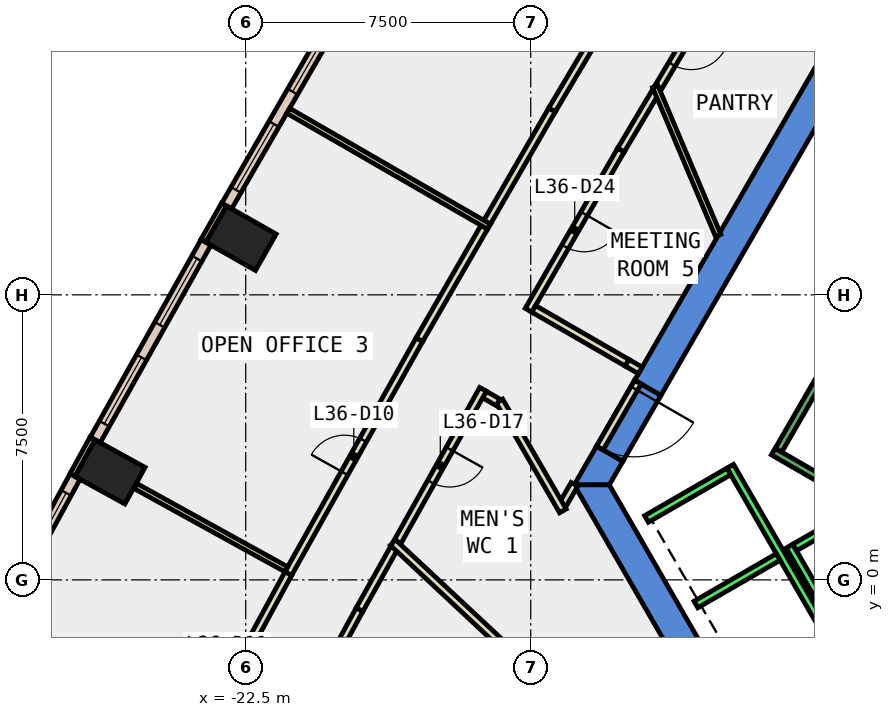
"""IFC4 building model, lengths in metres.
Left out: names, types, materials, properties, quantities, classifications, styles, units other than length and angle.
Written with IfcOpenShell. Run it as: python <this file> out.ifc"""

import sys

from ifc_helpers import new_model, si_unit, direction, frame, frame_2d, origin, origin_2d, place, context, subcontext, project, spatial, polyline, rectangle, outline, extrude, element, fill, save


model = new_model("IFC4")
c1 = context("Model", 3, precision=1e-05, world=origin(), true_north=direction((0.0, 1.0)))
c2 = subcontext(c1, "Body", "Model", "MODEL_VIEW")
j1 = project(units=[si_unit("LENGTHUNIT", "METRE"), si_unit("PLANEANGLEUNIT", "RADIAN")], contexts=[c1])
p1 = place(None, origin())
s1 = spatial("IfcSite", under=j1, at=p1, CompositionType="ELEMENT")
p2 = place(p1, origin())
s2 = spatial("IfcBuilding", under=s1, at=p2, CompositionType="ELEMENT")
p3 = place(p2, frame((0.0, 0.0, 163.4)))
s3 = spatial("IfcBuildingStorey", under=s2, at=p3, CompositionType="ELEMENT", Elevation=163.4)
for number, where, z_axis, x_axis in (
    (1, (-22.623, 8.991, -0.4), (0.0, 0.0, 1.0), (0.494, 0.869, 0.0)),
    (2, (-26.071, 2.841, -0.4), (0.0, 0.0, 1.0), (0.482, 0.876, 0.0)),
):
    element("IfcColumn", number, at=place(p3, frame(where, z_axis=z_axis, x_axis=x_axis)), inside=s3, PredefinedType="COLUMN", context=c2, shape_type="SweptSolid", body=[
        extrude(rectangle(XDim=1.1, YDim=1.5, at=origin_2d()), origin(), (0.0, 0.0, 1.0), 4.2),
    ])
p4 = place(p3, frame((0.0, 0.0, -0.4)))
e3 = element("IfcWall", 3, at=p4, inside=s3, PredefinedType="SHEAR", context=c2, shape_type="SweptSolid", body=[
    extrude(outline(polyline([(-12.267, 5.252), (-11.575, 4.852), (-6.466, 13.7), (-6.928, 14.5), (-12.267, 5.252)])), origin(), (0.0, 0.0, 1.0), 4.2),
])
p5 = place(p3, frame((0.0, 0.0, -0.4)))
e4 = element("IfcWall", 4, at=p5, inside=s3, PredefinedType="SHEAR", context=c2, shape_type="SweptSolid", body=[
    extrude(outline(polyline([(-12.575, 3.12), (-13.267, 3.52), (-13.856, 2.5), (-12.933, 2.5), (-12.575, 3.12)])), origin(), (0.0, 0.0, 1.0), 4.2),
])
p6 = place(p3, frame((0.0, 0.0, 3.6)))
e5 = element("IfcWall", 5, at=p6, inside=s3, PredefinedType="SHEAR", context=c2, shape_type="SweptSolid", body=[
    extrude(outline(polyline([(-13.267, 3.52), (-12.575, 3.12), (-11.575, 4.852), (-12.267, 5.252), (-13.267, 3.52)])), origin(), (0.0, 0.0, 1.0), 0.2),
])
p7 = place(p3, frame((0.0, 0.0, -0.4)))
e6 = element("IfcWall", 6, at=p7, inside=s3, PredefinedType="SHEAR", context=c2, shape_type="SweptSolid", body=[
    extrude(outline(polyline([(-13.856, 2.5), (-6.928, -9.5), (-6.466, -8.7), (-12.933, 2.5), (-13.856, 2.5)])), origin(), (0.0, 0.0, 1.0), 4.2),
])
p8 = place(p3, frame((-23.069, 9.877, 0.0), z_axis=(0.0, 0.0, 1.0), x_axis=(-0.494512685492, -0.869170411305, 0.0)))
e7 = element("IfcWall", 7, at=p8, inside=s3, PredefinedType="STANDARD", context=c2, shape_type="SweptSolid", body=[
    extrude(rectangle(XDim=1.1, YDim=0.15, at=frame_2d((0.55, 0.0))), origin(), (0.0, 0.0, 1.0), 3.8),
])
p9 = place(p3, frame((-26.529, 3.721, 0.0), z_axis=(0.0, 0.0, 1.0), x_axis=(-0.481850587491, -0.876253394478, 0.0)))
e8 = element("IfcWall", 8, at=p9, inside=s3, PredefinedType="STANDARD", context=c2, shape_type="SweptSolid", body=[
    extrude(rectangle(XDim=1.1, YDim=0.15, at=frame_2d((0.55, 0.0))), origin(), (0.0, 0.0, 1.0), 3.8),
])
p10 = place(p3, frame((-20.02, 15.002, 0.0), z_axis=(0.0, 0.0, 1.0), x_axis=(-0.49986421087, -0.866103787482, 0.0)))
e9 = element("IfcWall", 9, at=p10, inside=s3, PredefinedType="STANDARD", context=c2, shape_type="SweptSolid", body=[
    extrude(rectangle(XDim=5.964, YDim=0.3, at=frame_2d((2.982, 0.0))), origin(), (0.0, 0.0, 1.0), 3.8),
])
p11 = place(p10, frame((0.491, 0.0, 0.9)))
e10 = element("IfcOpeningElement", 10, at=p11, cuts=e9, PredefinedType="OPENING", context=c2, shape_type="SweptSolid", body=[
    extrude(rectangle(XDim=2.0, YDim=2.6, at=frame_2d((1.0, 1.3))), frame((0.0, 0.16, 0.0), z_axis=(0.0, -1.0, 0.0), x_axis=(1.0, 0.0, 0.0)), (0.0, 0.0, 1.0), 0.32),
])
p12 = place(p10, frame((3.473, 0.0, 0.9)))
e11 = element("IfcOpeningElement", 11, at=p12, cuts=e9, PredefinedType="OPENING", context=c2, shape_type="SweptSolid", body=[
    extrude(rectangle(XDim=2.0, YDim=2.6, at=frame_2d((1.0, 1.3))), frame((0.0, 0.16, 0.0), z_axis=(0.0, -1.0, 0.0), x_axis=(1.0, 0.0, 0.0)), (0.0, 0.0, 1.0), 0.32),
])
p13 = place(p3, frame((-23.544, 8.883, 0.0), z_axis=(0.0, 0.0, 1.0), x_axis=(-0.489032196971, -0.87226573378, 0.0)))
e12 = element("IfcWall", 12, at=p13, inside=s3, PredefinedType="STANDARD", context=c2, shape_type="SweptSolid", body=[
    extrude(rectangle(XDim=5.963, YDim=0.3, at=frame_2d((2.981, 0.0))), origin(), (0.0, 0.0, 1.0), 3.8),
])
p14 = place(p13, frame((0.491, 0.0, 0.9)))
e13 = element("IfcOpeningElement", 13, at=p14, cuts=e12, PredefinedType="OPENING", context=c2, shape_type="SweptSolid", body=[
    extrude(rectangle(XDim=2.0, YDim=2.6, at=frame_2d((1.0, 1.3))), frame((0.0, 0.16, 0.0), z_axis=(0.0, -1.0, 0.0), x_axis=(1.0, 0.0, 0.0)), (0.0, 0.0, 1.0), 0.32),
])
p15 = place(p13, frame((3.472, 0.0, 0.9)))
e14 = element("IfcOpeningElement", 14, at=p15, cuts=e12, PredefinedType="OPENING", context=c2, shape_type="SweptSolid", body=[
    extrude(rectangle(XDim=2.0, YDim=2.6, at=frame_2d((1.0, 1.3))), frame((0.0, 0.16, 0.0), z_axis=(0.0, -1.0, 0.0), x_axis=(1.0, 0.0, 0.0)), (0.0, 0.0, 1.0), 0.32),
])
p16 = place(p3, frame((-26.991, 2.72, 0.0), z_axis=(0.0, 0.0, 1.0), x_axis=(-0.477555226268, -0.878601733361, 0.0)))
e15 = element("IfcWall", 15, at=p16, inside=s3, PredefinedType="STANDARD", context=c2, shape_type="SweptSolid", body=[
    extrude(rectangle(XDim=5.964, YDim=0.3, at=frame_2d((2.982, 0.0))), origin(), (0.0, 0.0, 1.0), 3.8),
])
p17 = place(p16, frame((0.491, 0.0, 0.9)))
e16 = element("IfcOpeningElement", 16, at=p17, cuts=e15, PredefinedType="OPENING", context=c2, shape_type="SweptSolid", body=[
    extrude(rectangle(XDim=2.0, YDim=2.6, at=frame_2d((1.0, 1.3))), frame((0.0, 0.16, 0.0), z_axis=(0.0, -1.0, 0.0), x_axis=(1.0, 0.0, 0.0)), (0.0, 0.0, 1.0), 0.32),
])
p18 = place(p16, frame((3.473, 0.0, 0.9)))
e17 = element("IfcOpeningElement", 17, at=p18, cuts=e15, PredefinedType="OPENING", context=c2, shape_type="SweptSolid", body=[
    extrude(rectangle(XDim=2.0, YDim=2.6, at=frame_2d((1.0, 1.3))), frame((0.0, 0.16, 0.0), z_axis=(0.0, -1.0, 0.0), x_axis=(1.0, 0.0, 0.0)), (0.0, 0.0, 1.0), 0.32),
])
p19 = place(p3, frame((-10.41, 15.036, 0.0), z_axis=(0.0, 0.0, 1.0), x_axis=(-0.510900085603, -0.859640100583, 0.0)))
e18 = element("IfcWall", 18, at=p19, inside=s3, PredefinedType="PARTITIONING", context=c2, shape_type="SweptSolid", body=[
    extrude(rectangle(XDim=2.419, YDim=0.2, at=frame_2d((1.21, 0.0))), origin(), (0.0, 0.0, 1.0), 3.8),
])
p20 = place(p19, frame((0.709, 0.0, 0.0)))
e19 = element("IfcOpeningElement", 19, at=p20, cuts=e18, PredefinedType="OPENING", context=c2, shape_type="SweptSolid", body=[
    extrude(rectangle(XDim=1.0, YDim=2.1, at=frame_2d((0.5, 1.05))), frame((0.0, 0.11, 0.0), z_axis=(0.0, -1.0, 0.0), x_axis=(1.0, 0.0, 0.0)), (0.0, 0.0, 1.0), 0.22),
])
p21 = place(p3, frame((-11.723, 12.827, 0.0), z_axis=(0.0, 0.0, 1.0), x_axis=(-0.511182890129, -0.859471961637, 0.0)))
e20 = element("IfcWall", 20, at=p21, inside=s3, PredefinedType="PARTITIONING", context=c2, shape_type="SweptSolid", body=[
    extrude(rectangle(XDim=1.769, YDim=0.2, at=frame_2d((0.884, 0.0))), origin(), (0.0, 0.0, 1.0), 3.8),
])
p22 = place(p3, frame((-12.627, 11.307, 0.0), z_axis=(0.0, 0.0, 1.0), x_axis=(-0.499907870494, -0.866078588246, 0.0)))
e21 = element("IfcWall", 21, at=p22, inside=s3, PredefinedType="PARTITIONING", context=c2, shape_type="SweptSolid", body=[
    extrude(rectangle(XDim=4.863, YDim=0.2, at=frame_2d((2.432, 0.0))), origin(), (0.0, 0.0, 1.0), 3.8),
])
p23 = place(p22, frame((1.932, 0.0, 0.0)))
e22 = element("IfcOpeningElement", 22, at=p23, cuts=e21, PredefinedType="OPENING", context=c2, shape_type="SweptSolid", body=[
    extrude(rectangle(XDim=1.0, YDim=2.1, at=frame_2d((0.5, 1.05))), frame((0.0, 0.11, 0.0), z_axis=(0.0, -1.0, 0.0), x_axis=(1.0, 0.0, 0.0)), (0.0, 0.0, 1.0), 0.22),
])
p24 = place(p3, frame((-14.922, 7.131, 0.0), z_axis=(0.0, 0.0, 1.0), x_axis=(0.866124025492, -0.499829143273, 0.0)))
e23 = element("IfcWall", 23, at=p24, inside=s3, PredefinedType="PARTITIONING", context=c2, shape_type="SweptSolid", body=[
    extrude(rectangle(XDim=2.839, YDim=0.2, at=frame_2d((1.42, 0.0))), origin(), (0.0, 0.0, 1.0), 3.8),
])
p25 = place(p3, frame((-13.85, 2.514, 0.0), z_axis=(0.0, 0.0, 1.0), x_axis=(-0.500418219013, -0.865783810244, 0.0)))
e24 = element("IfcWall", 24, at=p25, inside=s3, PredefinedType="PARTITIONING", context=c2, shape_type="SweptSolid", body=[
    extrude(rectangle(XDim=0.607, YDim=0.2, at=frame_2d((0.304, 0.0))), origin(), (0.0, 0.0, 1.0), 3.8),
])
p26 = place(p3, frame((-14.154, 1.815, 0.0), z_axis=(0.0, 0.0, 1.0), x_axis=(-0.500038857296, 0.866002968352, 0.0)))
e25 = element("IfcWall", 25, at=p26, inside=s3, PredefinedType="PARTITIONING", context=c2, shape_type="SweptSolid", body=[
    extrude(rectangle(XDim=3.34, YDim=0.2, at=frame_2d((1.67, 0.0))), origin(), (0.0, 0.0, 1.0), 3.8),
])
p27 = place(p3, frame((-15.86, 4.671, 0.0), z_axis=(0.0, 0.0, 1.0), x_axis=(-0.866047486323, 0.49996174997, 0.0)))
e26 = element("IfcWall", 26, at=p27, inside=s3, PredefinedType="PARTITIONING", context=c2, shape_type="SweptSolid", body=[
    extrude(rectangle(XDim=0.412, YDim=0.2, at=frame_2d((0.206, 0.0))), origin(), (0.0, 0.0, 1.0), 3.8),
])
p28 = place(p3, frame((-16.255, 5.014, 0.0), z_axis=(0.0, 0.0, 1.0), x_axis=(-0.488988017817, -0.87229050117, 0.0)))
e27 = element("IfcWall", 27, at=p28, inside=s3, PredefinedType="PARTITIONING", context=c2, shape_type="SweptSolid", body=[
    extrude(rectangle(XDim=4.599, YDim=0.2, at=frame_2d((2.3, 0.0))), origin(), (0.0, 0.0, 1.0), 3.8),
])
p29 = place(p28, frame((1.8, 0.0, 0.0)))
e28 = element("IfcOpeningElement", 28, at=p29, cuts=e27, PredefinedType="OPENING", context=c2, shape_type="SweptSolid", body=[
    extrude(rectangle(XDim=1.0, YDim=2.1, at=frame_2d((0.5, 1.05))), frame((0.0, 0.11, 0.0), z_axis=(0.0, -1.0, 0.0), x_axis=(1.0, 0.0, 0.0)), (0.0, 0.0, 1.0), 0.22),
])
p30 = place(p3, frame((-18.602, 0.828, 0.0), z_axis=(0.0, 0.0, 1.0), x_axis=(-0.488969229043, -0.872301033502, 0.0)))
e29 = element("IfcWall", 29, at=p30, inside=s3, PredefinedType="PARTITIONING", context=c2, shape_type="SweptSolid", body=[
    extrude(rectangle(XDim=1.849, YDim=0.2, at=frame_2d((0.924, 0.0))), origin(), (0.0, 0.0, 1.0), 3.8),
])
p31 = place(p3, frame((-19.506, -0.785, 0.0), z_axis=(0.0, 0.0, 1.0), x_axis=(-0.477513909405, -0.878624189472, 0.0)))
e30 = element("IfcWall", 30, at=p31, inside=s3, PredefinedType="PARTITIONING", context=c2, shape_type="SweptSolid", body=[
    extrude(rectangle(XDim=6.956, YDim=0.2, at=frame_2d((3.478, 0.0))), origin(), (0.0, 0.0, 1.0), 3.8),
])
p32 = place(p31, frame((2.978, 0.0, 0.0)))
e31 = element("IfcOpeningElement", 31, at=p32, cuts=e30, PredefinedType="OPENING", context=c2, shape_type="SweptSolid", body=[
    extrude(rectangle(XDim=1.0, YDim=2.1, at=frame_2d((0.5, 1.05))), frame((0.0, 0.11, 0.0), z_axis=(0.0, -1.0, 0.0), x_axis=(1.0, 0.0, 0.0)), (0.0, 0.0, 1.0), 0.22),
])
p33 = place(p3, frame((-16.147, 9.41, 0.0), z_axis=(0.0, 0.0, 1.0), x_axis=(0.500044178772, 0.865999895656, 0.0)))
e32 = element("IfcWall", 32, at=p33, inside=s3, PredefinedType="PARTITIONING", context=c2, shape_type="SweptSolid", body=[
    extrude(rectangle(XDim=3.416, YDim=0.2, at=frame_2d((1.708, 0.0))), origin(), (0.0, 0.0, 1.0), 3.8),
])
p34 = place(p3, frame((-14.439, 12.368, 0.0), z_axis=(0.0, 0.0, 1.0), x_axis=(0.51096926939, 0.859598979606, 0.0)))
e33 = element("IfcWall", 33, at=p34, inside=s3, PredefinedType="PARTITIONING", context=c2, shape_type="SweptSolid", body=[
    extrude(rectangle(XDim=6.983, YDim=0.2, at=frame_2d((3.491, 0.0))), origin(), (0.0, 0.0, 1.0), 3.8),
])
p35 = place(p34, frame((2.991, 0.0, 0.0)))
e34 = element("IfcOpeningElement", 34, at=p35, cuts=e33, PredefinedType="OPENING", context=c2, shape_type="SweptSolid", body=[
    extrude(rectangle(XDim=1.0, YDim=2.1, at=frame_2d((0.5, 1.05))), frame((0.0, 0.11, 0.0), z_axis=(0.0, -1.0, 0.0), x_axis=(1.0, 0.0, 0.0)), (0.0, 0.0, 1.0), 0.22),
])
p36 = place(p3, frame((-21.381, 0.165, 0.0), z_axis=(0.0, 0.0, 1.0), x_axis=(0.489014139272, 0.872275857509, 0.0)))
e35 = element("IfcWall", 35, at=p36, inside=s3, PredefinedType="PARTITIONING", context=c2, shape_type="SweptSolid", body=[
    extrude(rectangle(XDim=7.057, YDim=0.2, at=frame_2d((3.529, 0.0))), origin(), (0.0, 0.0, 1.0), 3.8),
])
p37 = place(p36, frame((3.029, 0.0, 0.0)))
e36 = element("IfcOpeningElement", 36, at=p37, cuts=e35, PredefinedType="OPENING", context=c2, shape_type="SweptSolid", body=[
    extrude(rectangle(XDim=1.0, YDim=2.1, at=frame_2d((0.5, 1.05))), frame((0.0, 0.11, 0.0), z_axis=(0.0, -1.0, 0.0), x_axis=(1.0, 0.0, 0.0)), (0.0, 0.0, 1.0), 0.22),
])
p38 = place(p3, frame((-17.93, 6.321, 0.0), z_axis=(0.0, 0.0, 1.0), x_axis=(0.499920397431, 0.866071357471, 0.0)))
e37 = element("IfcWall", 37, at=p38, inside=s3, PredefinedType="PARTITIONING", context=c2, shape_type="SweptSolid", body=[
    extrude(rectangle(XDim=3.417, YDim=0.2, at=frame_2d((1.708, 0.0))), origin(), (0.0, 0.0, 1.0), 3.8),
])
p39 = place(p3, frame((-24.68, -5.906, 0.0), z_axis=(0.0, 0.0, 1.0), x_axis=(0.47757676389, 0.878590026459, 0.0)))
e38 = element("IfcWall", 38, at=p39, inside=s3, PredefinedType="PARTITIONING", context=c2, shape_type="SweptSolid", body=[
    extrude(rectangle(XDim=6.91, YDim=0.2, at=frame_2d((3.455, 0.0))), origin(), (0.0, 0.0, 1.0), 3.8),
])
p40 = place(p39, frame((3.029, 0.0, 0.0)))
e39 = element("IfcOpeningElement", 39, at=p40, cuts=e38, PredefinedType="OPENING", context=c2, shape_type="SweptSolid", body=[
    extrude(rectangle(XDim=1.0, YDim=2.1, at=frame_2d((0.5, 1.05))), frame((0.0, 0.11, 0.0), z_axis=(0.0, -1.0, 0.0), x_axis=(1.0, 0.0, 0.0)), (0.0, 0.0, 1.0), 0.22),
])
p41 = place(p3, frame((-10.068, 9.062, 0.0), z_axis=(0.0, 0.0, 1.0), x_axis=(-0.388992587102, 0.921240884448, 0.0)))
e40 = element("IfcWall", 40, at=p41, inside=s3, PredefinedType="PARTITIONING", context=c2, shape_type="SweptSolid", body=[
    extrude(rectangle(XDim=4.257, YDim=0.15, at=frame_2d((2.128, 0.0))), origin(), (0.0, 0.0, 1.0), 3.8),
])
p42 = place(p3, frame((-11.372, -5.79, 0.0), z_axis=(0.0, 0.0, 1.0), x_axis=(-0.730922728623, 0.682460229451, 0.0)))
e41 = element("IfcWall", 41, at=p42, inside=s3, PredefinedType="PARTITIONING", context=c2, shape_type="SweptSolid", body=[
    extrude(rectangle(XDim=9.924, YDim=0.2, at=frame_2d((4.962, 0.0))), origin(), (0.0, 0.0, 1.0), 3.8),
])
p43 = place(p3, frame((-16.098, 9.295, 0.0), z_axis=(0.0, 0.0, 1.0), x_axis=(-0.866109615698, 0.499854112313, 0.0)))
e42 = element("IfcWall", 42, at=p43, inside=s3, PredefinedType="PARTITIONING", context=c2, shape_type="SweptSolid", body=[
    extrude(rectangle(XDim=6.1, YDim=0.15, at=frame_2d((3.05, 0.0))), origin(), (0.0, 0.0, 1.0), 3.8),
])
p44 = place(p3, frame((-21.432, 0.278, 0.0), z_axis=(0.0, 0.0, 1.0), x_axis=(-0.875412579047, 0.483376474857, 0.0)))
e43 = element("IfcWall", 43, at=p44, inside=s3, PredefinedType="PARTITIONING", context=c2, shape_type="SweptSolid", body=[
    extrude(rectangle(XDim=4.531, YDim=0.15, at=frame_2d((2.265, 0.0))), origin(), (0.0, 0.0, 1.0), 3.8),
])
p45 = place(p3, frame((-12.18, 5.202, 0.0), z_axis=(0.0, 0.0, 1.0), x_axis=(-0.50002537861, -0.866010750942, 0.0)))
e44 = element("IfcWall", 44, at=p45, inside=s3, PredefinedType="PARTITIONING", context=c2, shape_type="SweptSolid", body=[
    extrude(rectangle(XDim=2.0, YDim=0.2, at=frame_2d((1.0, 0.0))), origin(), (0.0, 0.0, 1.0), 2.4),
])
p46 = place(p45, frame((0.19, 0.0, 0.0)))
e45 = element("IfcOpeningElement", 45, at=p46, cuts=e44, PredefinedType="OPENING", context=c2, shape_type="SweptSolid", body=[
    extrude(rectangle(XDim=1.8, YDim=2.1, at=frame_2d((0.9, 1.05))), frame((0.0, 0.11, 0.0), z_axis=(0.0, -1.0, 0.0), x_axis=(1.0, 0.0, 0.0)), (0.0, 0.0, 1.0), 0.22),
])
p47 = place(p3, frame((-12.463, 5.712, 0.0), z_axis=(0.0, 0.0, 1.0), x_axis=(0.865788603161, -0.500409926597, 0.0)))
e46 = element("IfcWall", 46, at=p47, inside=s3, PredefinedType="PARTITIONING", context=c2, shape_type="SweptSolid", body=[
    extrude(rectangle(XDim=0.4, YDim=0.2, at=frame_2d((0.2, 0.0))), origin(), (0.0, 0.0, 1.0), 2.4),
])
p48 = place(p3, frame((-8.192, 0.888, 0.0), z_axis=(0.0, 0.0, 1.0), x_axis=(0.49994636267, -0.866056369097, 0.0)))
e47 = element("IfcWall", 47, at=p48, inside=s3, PredefinedType="STANDARD", context=c2, shape_type="SweptSolid", body=[
    extrude(rectangle(XDim=2.8, YDim=0.2, at=frame_2d((1.4, 0.0))), origin(), (0.0, 0.0, 1.0), 3.8),
])
p49 = place(p3, frame((-5.977, 2.052, 0.0), z_axis=(0.0, 0.0, 1.0), x_axis=(-0.865973769406, -0.500089422704, 0.0)))
e48 = element("IfcWall", 48, at=p49, inside=s3, PredefinedType="STANDARD", context=c2, shape_type="SweptSolid", body=[
    extrude(rectangle(XDim=2.399, YDim=0.2, at=frame_2d((1.2, 0.0))), origin(), (0.0, 0.0, 1.0), 3.8),
])
p50 = place(p3, frame((-9.751, 2.99, 0.0), z_axis=(0.0, 0.0, 1.0), x_axis=(0.50000090737, -0.866024879913, 0.0)))
e49 = element("IfcWall", 49, at=p50, inside=s3, PredefinedType="STANDARD", context=c2, shape_type="SweptSolid", body=[
    extrude(rectangle(XDim=10.6, YDim=0.2, at=frame_2d((5.3, 0.0))), origin(), (0.0, 0.0, 1.0), 3.8),
])
p51 = place(p3, frame((-9.788, 2.853, 0.0), z_axis=(0.0, 0.0, 1.0), x_axis=(-0.865998541277, -0.500046524342, 0.0)))
e50 = element("IfcWall", 50, at=p51, inside=s3, PredefinedType="STANDARD", context=c2, shape_type="SweptSolid", body=[
    extrude(rectangle(XDim=2.5, YDim=0.2, at=frame_2d((1.25, 0.0))), origin(), (0.0, 0.0, 1.0), 3.8),
])
p52 = place(p3, frame((-8.488, 0.602, 0.0), z_axis=(0.0, 0.0, 1.0), x_axis=(-0.866022959057, -0.500004234368, 0.0)))
e51 = element("IfcWall", 51, at=p52, inside=s3, PredefinedType="STANDARD", context=c2, shape_type="SweptSolid", body=[
    extrude(rectangle(XDim=2.5, YDim=0.2, at=frame_2d((1.25, 0.0))), origin(), (0.0, 0.0, 1.0), 3.8),
])
p53 = place(p3, frame((-6.25, 2.01, 0.0), z_axis=(0.0, 0.0, 1.0), x_axis=(-0.86611865017, 0.499838457731, 0.0)))
e52 = element("IfcWall", 52, at=p53, inside=s3, PredefinedType="STANDARD", context=c2, shape_type="SweptSolid", body=[
    extrude(rectangle(XDim=2.733, YDim=0.2, at=frame_2d((1.366, 0.0))), origin(), (0.0, 0.0, 1.0), 3.8),
])
p54 = place(p3, frame((-5.03, 9.388, 0.0), z_axis=(0.0, 0.0, 1.0), x_axis=(-0.499978703459, -0.866037698999, 0.0)))
e53 = element("IfcWall", 53, at=p54, inside=s3, PredefinedType="STANDARD", context=c2, shape_type="SweptSolid", body=[
    extrude(rectangle(XDim=6.9, YDim=0.2, at=frame_2d((3.45, 0.0))), origin(), (0.0, 0.0, 1.0), 3.8),
])
p55 = place(p11, origin())
e54 = element("IfcWindow", 54, at=p55, inside=s3, PartitioningType="SINGLE_PANEL", PredefinedType="WINDOW", context=c2, shape_type="SweptSolid", body=[
    extrude(rectangle(XDim=2.0, YDim=2.6, at=frame_2d((1.0, 1.3))), frame((0.0, 0.03, 0.0), z_axis=(0.0, -1.0, 0.0), x_axis=(1.0, 0.0, 0.0)), (0.0, 0.0, 1.0), 0.06),
])
fill(e10, e54)
p56 = place(p12, origin())
e55 = element("IfcWindow", 55, at=p56, inside=s3, PartitioningType="SINGLE_PANEL", PredefinedType="WINDOW", context=c2, shape_type="SweptSolid", body=[
    extrude(rectangle(XDim=2.0, YDim=2.6, at=frame_2d((1.0, 1.3))), frame((0.0, 0.03, 0.0), z_axis=(0.0, -1.0, 0.0), x_axis=(1.0, 0.0, 0.0)), (0.0, 0.0, 1.0), 0.06),
])
fill(e11, e55)
p57 = place(p14, origin())
e56 = element("IfcWindow", 56, at=p57, inside=s3, PartitioningType="SINGLE_PANEL", PredefinedType="WINDOW", context=c2, shape_type="SweptSolid", body=[
    extrude(rectangle(XDim=2.0, YDim=2.6, at=frame_2d((1.0, 1.3))), frame((0.0, 0.03, 0.0), z_axis=(0.0, -1.0, 0.0), x_axis=(1.0, 0.0, 0.0)), (0.0, 0.0, 1.0), 0.06),
])
fill(e13, e56)
p58 = place(p15, origin())
e57 = element("IfcWindow", 57, at=p58, inside=s3, PartitioningType="SINGLE_PANEL", PredefinedType="WINDOW", context=c2, shape_type="SweptSolid", body=[
    extrude(rectangle(XDim=2.0, YDim=2.6, at=frame_2d((1.0, 1.3))), frame((0.0, 0.03, 0.0), z_axis=(0.0, -1.0, 0.0), x_axis=(1.0, 0.0, 0.0)), (0.0, 0.0, 1.0), 0.06),
])
fill(e14, e57)
p59 = place(p17, origin())
e58 = element("IfcWindow", 58, at=p59, inside=s3, PartitioningType="SINGLE_PANEL", PredefinedType="WINDOW", context=c2, shape_type="SweptSolid", body=[
    extrude(rectangle(XDim=2.0, YDim=2.6, at=frame_2d((1.0, 1.3))), frame((0.0, 0.03, 0.0), z_axis=(0.0, -1.0, 0.0), x_axis=(1.0, 0.0, 0.0)), (0.0, 0.0, 1.0), 0.06),
])
fill(e16, e58)
p60 = place(p37, origin())
e59 = element("IfcDoor", 59, at=p60, inside=s3, OperationType="SINGLE_SWING_RIGHT", PredefinedType="DOOR", context=c2, shape_type="SweptSolid", body=[
    extrude(rectangle(XDim=1.0, YDim=2.1, at=frame_2d((0.5, 1.05))), frame((0.0, 0.025, 0.0), z_axis=(0.0, -1.0, 0.0), x_axis=(1.0, 0.0, 0.0)), (0.0, 0.0, 1.0), 0.05),
])
fill(e36, e59)
p61 = place(p29, origin())
e60 = element("IfcDoor", 60, at=p61, inside=s3, OperationType="SINGLE_SWING_LEFT", PredefinedType="DOOR", context=c2, shape_type="SweptSolid", body=[
    extrude(rectangle(XDim=1.0, YDim=2.1, at=frame_2d((0.5, 1.05))), frame((0.0, 0.025, 0.0), z_axis=(0.0, -1.0, 0.0), x_axis=(1.0, 0.0, 0.0)), (0.0, 0.0, 1.0), 0.05),
])
fill(e28, e60)
p62 = place(p20, origin())
e61 = element("IfcDoor", 61, at=p62, inside=s3, OperationType="SINGLE_SWING_LEFT", PredefinedType="DOOR", context=c2, shape_type="SweptSolid", body=[
    extrude(rectangle(XDim=1.0, YDim=2.1, at=frame_2d((0.5, 1.05))), frame((0.0, 0.025, 0.0), z_axis=(0.0, -1.0, 0.0), x_axis=(1.0, 0.0, 0.0)), (0.0, 0.0, 1.0), 0.05),
])
fill(e19, e61)
p63 = place(p23, origin())
e62 = element("IfcDoor", 62, at=p63, inside=s3, OperationType="SINGLE_SWING_LEFT", PredefinedType="DOOR", context=c2, shape_type="SweptSolid", body=[
    extrude(rectangle(XDim=1.0, YDim=2.1, at=frame_2d((0.5, 1.05))), frame((0.0, 0.025, 0.0), z_axis=(0.0, -1.0, 0.0), x_axis=(1.0, 0.0, 0.0)), (0.0, 0.0, 1.0), 0.05),
])
fill(e22, e62)
p64 = place(p46, origin())
e63 = element("IfcDoor", 63, at=p64, inside=s3, OperationType="DOUBLE_DOOR_SINGLE_SWING", PredefinedType="DOOR", context=c2, shape_type="SweptSolid", body=[
    extrude(rectangle(XDim=1.8, YDim=2.1, at=frame_2d((0.9, 1.05))), frame((0.0, 0.025, 0.0), z_axis=(0.0, -1.0, 0.0), x_axis=(1.0, 0.0, 0.0)), (0.0, 0.0, 1.0), 0.05),
])
fill(e45, e63)
save(model, sys.argv[1])
